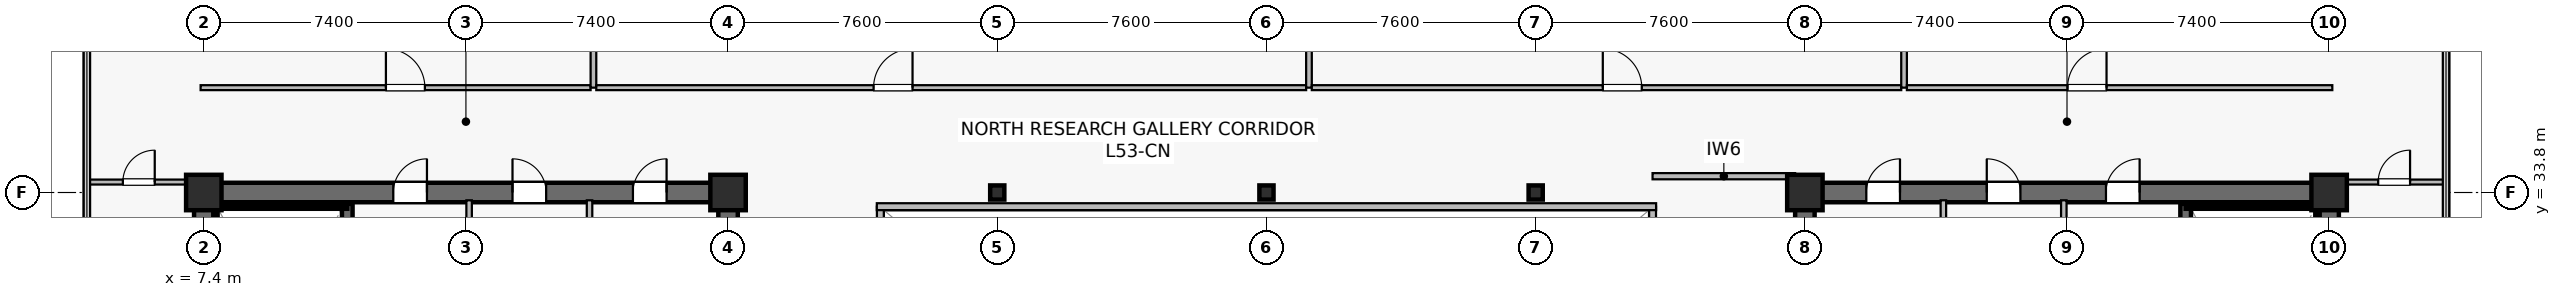
"""IFC4 building model, lengths in metres.
Left out: names, types, materials, properties, quantities, classifications, styles, units other than length and angle.
Written with IfcOpenShell. Run it as: python <this file> out.ifc"""

import sys

from ifc_helpers import new_model, si_unit, direction, frame, frame_2d, origin, origin_2d, place, context, subcontext, project, spatial, rectangle, hollow_rectangle, extrude, source, transform, mapped, element, fill, save


model = new_model("IFC4")
c1 = context("Model", 3, precision=1e-05, world=origin(), true_north=direction((0.0, 1.0)))
c2 = subcontext(c1, "Body", "Model", "MODEL_VIEW")
j1 = project(units=[si_unit("LENGTHUNIT", "METRE"), si_unit("PLANEANGLEUNIT", "RADIAN")], contexts=[c1])
p1 = place(None, origin())
s1 = spatial("IfcSite", under=j1, at=p1, CompositionType="ELEMENT")
p2 = place(p1, origin())
s2 = spatial("IfcBuilding", under=s1, at=p2, CompositionType="ELEMENT")
p3 = place(p2, frame((0.0, 0.0, 221.9)))
s3 = spatial("IfcBuildingStorey", under=s2, at=p3, CompositionType="ELEMENT", Elevation=221.9)
p4 = place(p3, frame((7.125, 33.8, 0.0), z_axis=(0.0, 0.0, 1.0), x_axis=(1.0, 0.0, 0.0)))
e1 = element("IfcWall", 1, at=p4, inside=s3, PredefinedType="SHEAR", context=c2, shape_type="SweptSolid", body=[
    extrude(rectangle(XDim=15.35, YDim=0.55, at=frame_2d((7.675, 0.0))), origin(), (0.0, 0.0, 1.0), 3.8),
])
p5 = place(p4, frame((5.625, 0.0, 0.0)))
e2 = element("IfcOpeningElement", 2, at=p5, cuts=e1, PredefinedType="OPENING", context=c2, shape_type="SweptSolid", body=[
    extrude(rectangle(XDim=0.95, YDim=2.15, at=frame_2d((0.475, 1.075))), frame((0.0, 0.285, 0.0), z_axis=(0.0, -1.0, 0.0), x_axis=(1.0, 0.0, 0.0)), (0.0, 0.0, 1.0), 0.57),
])
p6 = place(p4, frame((8.99, 0.0, 0.0)))
e3 = element("IfcOpeningElement", 3, at=p6, cuts=e1, PredefinedType="OPENING", context=c2, shape_type="SweptSolid", body=[
    extrude(rectangle(XDim=0.95, YDim=2.15, at=frame_2d((0.475, 1.075))), frame((0.0, 0.285, 0.0), z_axis=(0.0, -1.0, 0.0), x_axis=(1.0, 0.0, 0.0)), (0.0, 0.0, 1.0), 0.57),
])
p7 = place(p4, frame((12.39, 0.0, 0.0)))
e4 = element("IfcOpeningElement", 4, at=p7, cuts=e1, PredefinedType="OPENING", context=c2, shape_type="SweptSolid", body=[
    extrude(rectangle(XDim=0.95, YDim=2.15, at=frame_2d((0.475, 1.075))), frame((0.0, 0.285, 0.0), z_axis=(0.0, -1.0, 0.0), x_axis=(1.0, 0.0, 0.0)), (0.0, 0.0, 1.0), 0.57),
])
p8 = place(p3, frame((7.4, 15.075, 0.0), z_axis=(0.0, 0.0, 1.0), x_axis=(0.0, 1.0, 0.0)))
e5 = element("IfcWall", 5, at=p8, inside=s3, PredefinedType="SHEAR", context=c2, shape_type="SweptSolid", body=[
    extrude(rectangle(XDim=18.45, YDim=0.55, at=frame_2d((9.225, 0.0))), origin(), (0.0, 0.0, 1.0), 3.8),
])
p9 = place(p3, frame((22.2, 15.075, 0.0), z_axis=(0.0, 0.0, 1.0), x_axis=(0.0, 1.0, 0.0)))
e6 = element("IfcWall", 6, at=p9, inside=s3, PredefinedType="SHEAR", context=c2, shape_type="SweptSolid", body=[
    extrude(rectangle(XDim=18.45, YDim=0.55, at=frame_2d((9.225, 0.0))), origin(), (0.0, 0.0, 1.0), 3.8),
])
p10 = place(p9, frame((3.475, 0.0, 0.0)))
e7 = element("IfcOpeningElement", 7, at=p10, cuts=e6, PredefinedType="OPENING", context=c2, shape_type="SweptSolid", body=[
    extrude(rectangle(XDim=1.42, YDim=2.2, at=frame_2d((0.71, 1.1))), frame((0.0, 0.285, 0.0), z_axis=(0.0, -1.0, 0.0), x_axis=(1.0, 0.0, 0.0)), (0.0, 0.0, 1.0), 0.57),
])
p11 = place(p3, frame((11.45, 24.85, 0.0), z_axis=(0.0, 0.0, 1.0), x_axis=(0.0, 1.0, 0.0)))
e8 = element("IfcWall", 8, at=p11, inside=s3, PredefinedType="SHEAR", context=c2, shape_type="SweptSolid", body=[
    extrude(rectangle(XDim=8.63, YDim=0.3, at=frame_2d((4.315, 0.0))), origin(), (0.0, 0.0, 1.0), 3.8),
])
p12 = place(p11, frame((0.42, 0.0, 0.0)))
e9 = element("IfcOpeningElement", 9, at=p12, cuts=e8, PredefinedType="OPENING", context=c2, shape_type="SweptSolid", body=[
    extrude(rectangle(XDim=1.1, YDim=2.15, at=frame_2d((0.55, 1.075))), frame((0.0, 0.16, 0.0), z_axis=(0.0, -1.0, 0.0), x_axis=(1.0, 0.0, 0.0)), (0.0, 0.0, 1.0), 0.32),
])
p13 = place(p3, frame((7.73, 33.4, 0.0), z_axis=(0.0, 0.0, 1.0), x_axis=(1.0, 0.0, 0.0)))
e10 = element("IfcWall", 10, at=p13, inside=s3, PredefinedType="SOLIDWALL", context=c2, shape_type="SweptSolid", body=[
    extrude(rectangle(XDim=3.72, YDim=0.12, at=frame_2d((1.86, 0.0))), origin(), (0.0, 0.0, 1.0), 3.8),
])
p14 = place(p3, frame((7.73, 25.0, 0.0), z_axis=(0.0, 0.0, 1.0), x_axis=(0.0, 1.0, 0.0)))
e11 = element("IfcWall", 11, at=p14, inside=s3, PredefinedType="SOLIDWALL", context=c2, shape_type="SweptSolid", body=[
    extrude(rectangle(XDim=8.32, YDim=0.12, at=frame_2d((4.16, 0.0))), origin(), (0.0, 0.0, 1.0), 3.8),
])
p15 = place(p3, frame((52.325, 33.8, 0.0), z_axis=(0.0, 0.0, 1.0), x_axis=(1.0, 0.0, 0.0)))
e12 = element("IfcWall", 12, at=p15, inside=s3, PredefinedType="SHEAR", context=c2, shape_type="SweptSolid", body=[
    extrude(rectangle(XDim=15.35, YDim=0.55, at=frame_2d((7.675, 0.0))), origin(), (0.0, 0.0, 1.0), 3.8),
])
p16 = place(p15, frame((8.775, 0.0, 0.0)))
e13 = element("IfcOpeningElement", 13, at=p16, cuts=e12, PredefinedType="OPENING", context=c2, shape_type="SweptSolid", body=[
    extrude(rectangle(XDim=0.95, YDim=2.15, at=frame_2d((0.475, 1.075))), frame((0.0, 0.285, 0.0), z_axis=(0.0, -1.0, 0.0), x_axis=(1.0, 0.0, 0.0)), (0.0, 0.0, 1.0), 0.57),
])
p17 = place(p15, frame((5.41, 0.0, 0.0)))
e14 = element("IfcOpeningElement", 14, at=p17, cuts=e12, PredefinedType="OPENING", context=c2, shape_type="SweptSolid", body=[
    extrude(rectangle(XDim=0.95, YDim=2.15, at=frame_2d((0.475, 1.075))), frame((0.0, 0.285, 0.0), z_axis=(0.0, -1.0, 0.0), x_axis=(1.0, 0.0, 0.0)), (0.0, 0.0, 1.0), 0.57),
])
p18 = place(p15, frame((2.01, 0.0, 0.0)))
e15 = element("IfcOpeningElement", 15, at=p18, cuts=e12, PredefinedType="OPENING", context=c2, shape_type="SweptSolid", body=[
    extrude(rectangle(XDim=0.95, YDim=2.15, at=frame_2d((0.475, 1.075))), frame((0.0, 0.285, 0.0), z_axis=(0.0, -1.0, 0.0), x_axis=(1.0, 0.0, 0.0)), (0.0, 0.0, 1.0), 0.57),
])
p19 = place(p3, frame((52.6, 15.075, 0.0), z_axis=(0.0, 0.0, 1.0), x_axis=(0.0, 1.0, 0.0)))
e16 = element("IfcWall", 16, at=p19, inside=s3, PredefinedType="SHEAR", context=c2, shape_type="SweptSolid", body=[
    extrude(rectangle(XDim=18.45, YDim=0.55, at=frame_2d((9.225, 0.0))), origin(), (0.0, 0.0, 1.0), 3.8),
])
p20 = place(p19, frame((3.475, 0.0, 0.0)))
e17 = element("IfcOpeningElement", 17, at=p20, cuts=e16, PredefinedType="OPENING", context=c2, shape_type="SweptSolid", body=[
    extrude(rectangle(XDim=1.42, YDim=2.2, at=frame_2d((0.71, 1.1))), frame((0.0, 0.285, 0.0), z_axis=(0.0, -1.0, 0.0), x_axis=(1.0, 0.0, 0.0)), (0.0, 0.0, 1.0), 0.57),
])
p21 = place(p3, frame((67.4, 15.075, 0.0), z_axis=(0.0, 0.0, 1.0), x_axis=(0.0, 1.0, 0.0)))
e18 = element("IfcWall", 18, at=p21, inside=s3, PredefinedType="SHEAR", context=c2, shape_type="SweptSolid", body=[
    extrude(rectangle(XDim=18.45, YDim=0.55, at=frame_2d((9.225, 0.0))), origin(), (0.0, 0.0, 1.0), 3.8),
])
p22 = place(p3, frame((63.35, 24.85, 0.0), z_axis=(0.0, 0.0, 1.0), x_axis=(0.0, 1.0, 0.0)))
e19 = element("IfcWall", 19, at=p22, inside=s3, PredefinedType="SHEAR", context=c2, shape_type="SweptSolid", body=[
    extrude(rectangle(XDim=8.63, YDim=0.3, at=frame_2d((4.315, 0.0))), origin(), (0.0, 0.0, 1.0), 3.8),
])
p23 = place(p22, frame((0.42, 0.0, 0.0)))
e20 = element("IfcOpeningElement", 20, at=p23, cuts=e19, PredefinedType="OPENING", context=c2, shape_type="SweptSolid", body=[
    extrude(rectangle(XDim=1.1, YDim=2.15, at=frame_2d((0.55, 1.075))), frame((0.0, 0.16, 0.0), z_axis=(0.0, -1.0, 0.0), x_axis=(1.0, 0.0, 0.0)), (0.0, 0.0, 1.0), 0.32),
])
p24 = place(p3, frame((63.35, 33.4, 0.0), z_axis=(0.0, 0.0, 1.0), x_axis=(1.0, 0.0, 0.0)))
e21 = element("IfcWall", 21, at=p24, inside=s3, PredefinedType="SOLIDWALL", context=c2, shape_type="SweptSolid", body=[
    extrude(rectangle(XDim=3.72, YDim=0.12, at=frame_2d((1.86, 0.0))), origin(), (0.0, 0.0, 1.0), 3.8),
])
p25 = place(p3, frame((67.07, 25.0, 0.0), z_axis=(0.0, 0.0, 1.0), x_axis=(0.0, 1.0, 0.0)))
e22 = element("IfcWall", 22, at=p25, inside=s3, PredefinedType="SOLIDWALL", context=c2, shape_type="SweptSolid", body=[
    extrude(rectangle(XDim=8.32, YDim=0.12, at=frame_2d((4.16, 0.0))), origin(), (0.0, 0.0, 1.0), 3.8),
])
m1 = source(origin(), c2, "Body", "SweptSolid", [
    extrude(rectangle(XDim=1.0, YDim=1.0, at=origin_2d()), origin(), (0.0, 0.0, 1.0), 4.1),
])
for number, where, z_axis, x_axis in (
    (23, (7.4, 33.8, 0.0), (0.0, 0.0, 1.0), (1.0, 0.0, 0.0)),
    (24, (22.2, 33.8, 0.0), (0.0, 0.0, 1.0), (1.0, 0.0, 0.0)),
    (25, (52.6, 33.8, 0.0), (0.0, 0.0, 1.0), (1.0, 0.0, 0.0)),
    (26, (67.4, 33.8, 0.0), (0.0, 0.0, 1.0), (1.0, 0.0, 0.0)),
):
    element("IfcColumn", number, at=place(p3, frame(where, z_axis=z_axis, x_axis=x_axis)), inside=s3, PredefinedType="COLUMN", context=c2, shape_type="MappedRepresentation", body=[
        mapped(m1, transform((0.0, 0.0, 0.0), scale=1.0)),
    ])
m2 = source(origin(), c2, "Body", "SweptSolid", [
    extrude(hollow_rectangle(XDim=0.4, YDim=0.4, WallThickness=0.019, at=origin_2d()), origin(), (0.0, 0.0, 1.0), 4.1),
])
for number, where, z_axis, x_axis in (
    (27, (29.8, 33.8, 0.0), (0.0, 0.0, 1.0), (1.0, 0.0, 0.0)),
    (28, (37.4, 33.8, 0.0), (0.0, 0.0, 1.0), (1.0, 0.0, 0.0)),
    (29, (45.0, 33.8, 0.0), (0.0, 0.0, 1.0), (1.0, 0.0, 0.0)),
):
    element("IfcColumn", number, at=place(p3, frame(where, z_axis=z_axis, x_axis=x_axis)), inside=s3, PredefinedType="COLUMN", context=c2, shape_type="MappedRepresentation", body=[
        mapped(m2, transform((0.0, 0.0, 0.0), scale=1.0)),
    ])
p26 = place(p3, frame((14.89, 29.65, 0.0), z_axis=(0.0, 0.0, 1.0), x_axis=(0.0, 1.0, 0.0)))
e30 = element("IfcWall", 30, at=p26, inside=s3, PredefinedType="PLUMBINGWALL", context=c2, shape_type="SweptSolid", body=[
    extrude(rectangle(XDim=3.93, YDim=0.155, at=frame_2d((1.965, 0.0))), origin(), (0.0, 0.0, 1.0), 3.197),
])
p27 = place(p3, frame((18.29, 29.65, 0.0), z_axis=(0.0, 0.0, 1.0), x_axis=(0.0, 1.0, 0.0)))
e31 = element("IfcWall", 31, at=p27, inside=s3, PredefinedType="PLUMBINGWALL", context=c2, shape_type="SweptSolid", body=[
    extrude(rectangle(XDim=3.93, YDim=0.155, at=frame_2d((1.965, 0.0))), origin(), (0.0, 0.0, 1.0), 3.8),
])
p28 = place(p3, frame((59.91, 29.65, 0.0), z_axis=(0.0, 0.0, 1.0), x_axis=(0.0, 1.0, 0.0)))
e32 = element("IfcWall", 32, at=p28, inside=s3, PredefinedType="PLUMBINGWALL", context=c2, shape_type="SweptSolid", body=[
    extrude(rectangle(XDim=3.93, YDim=0.155, at=frame_2d((1.965, 0.0))), origin(), (0.0, 0.0, 1.0), 3.197),
])
p29 = place(p3, frame((56.51, 29.65, 0.0), z_axis=(0.0, 0.0, 1.0), x_axis=(0.0, 1.0, 0.0)))
e33 = element("IfcWall", 33, at=p29, inside=s3, PredefinedType="PLUMBINGWALL", context=c2, shape_type="SweptSolid", body=[
    extrude(rectangle(XDim=3.93, YDim=0.155, at=frame_2d((1.965, 0.0))), origin(), (0.0, 0.0, 1.0), 3.8),
])
p30 = place(p3, frame((48.3, 34.26, 0.0), z_axis=(0.0, 0.0, 1.0), x_axis=(1.0, 0.0, 0.0)))
e34 = element("IfcWall", 34, at=p30, inside=s3, PredefinedType="PARTITIONING", context=c2, shape_type="SweptSolid", body=[
    extrude(rectangle(XDim=4.025, YDim=0.175, at=frame_2d((2.012, 0.0))), origin(), (0.0, 0.0, 1.0), 3.485),
])
p31 = place(p3, frame((26.5, 15.2, 0.0), z_axis=(0.0, 0.0, 1.0), x_axis=(0.0, 1.0, 0.0)))
e35 = element("IfcWall", 35, at=p31, inside=s3, PredefinedType="SOLIDWALL", context=c2, shape_type="SweptSolid", body=[
    extrude(rectangle(XDim=18.2, YDim=0.195, at=frame_2d((9.1, 0.0))), origin(), (0.0, 0.0, 1.0), 3.8),
])
p32 = place(p31, frame((1.8, 0.0, 0.9)))
e36 = element("IfcOpeningElement", 36, at=p32, cuts=e35, PredefinedType="OPENING", context=c2, shape_type="SweptSolid", body=[
    extrude(rectangle(XDim=1.2, YDim=1.35, at=frame_2d((0.6, 0.675))), frame((0.0, 0.107, 0.0), z_axis=(0.0, -1.0, 0.0), x_axis=(1.0, 0.0, 0.0)), (0.0, 0.0, 1.0), 0.215),
])
p33 = place(p31, frame((13.2, 0.0, 0.9)))
e37 = element("IfcOpeningElement", 37, at=p33, cuts=e35, PredefinedType="OPENING", context=c2, shape_type="SweptSolid", body=[
    extrude(rectangle(XDim=1.2, YDim=1.35, at=frame_2d((0.6, 0.675))), frame((0.0, 0.107, 0.0), z_axis=(0.0, -1.0, 0.0), x_axis=(1.0, 0.0, 0.0)), (0.0, 0.0, 1.0), 0.215),
])
p34 = place(p3, frame((48.3, 15.2, 0.0), z_axis=(0.0, 0.0, 1.0), x_axis=(0.0, 1.0, 0.0)))
e38 = element("IfcWall", 38, at=p34, inside=s3, PredefinedType="SOLIDWALL", context=c2, shape_type="SweptSolid", body=[
    extrude(rectangle(XDim=18.2, YDim=0.195, at=frame_2d((9.1, 0.0))), origin(), (0.0, 0.0, 1.0), 3.8),
])
p35 = place(p34, frame((1.8, 0.0, 0.9)))
e39 = element("IfcOpeningElement", 39, at=p35, cuts=e38, PredefinedType="OPENING", context=c2, shape_type="SweptSolid", body=[
    extrude(rectangle(XDim=1.2, YDim=1.35, at=frame_2d((0.6, 0.675))), frame((0.0, 0.107, 0.0), z_axis=(0.0, -1.0, 0.0), x_axis=(1.0, 0.0, 0.0)), (0.0, 0.0, 1.0), 0.215),
])
p36 = place(p34, frame((13.2, 0.0, 0.9)))
e40 = element("IfcOpeningElement", 40, at=p36, cuts=e38, PredefinedType="OPENING", context=c2, shape_type="SweptSolid", body=[
    extrude(rectangle(XDim=1.2, YDim=1.35, at=frame_2d((0.6, 0.675))), frame((0.0, 0.107, 0.0), z_axis=(0.0, -1.0, 0.0), x_axis=(1.0, 0.0, 0.0)), (0.0, 0.0, 1.0), 0.215),
])
p37 = place(p3, frame((26.4, 33.4, 0.0), z_axis=(0.0, 0.0, 1.0), x_axis=(1.0, 0.0, 0.0)))
e41 = element("IfcWall", 41, at=p37, inside=s3, PredefinedType="SOLIDWALL", context=c2, shape_type="SweptSolid", body=[
    extrude(rectangle(XDim=22.0, YDim=0.195, at=frame_2d((11.0, 0.0))), origin(), (0.0, 0.0, 1.0), 3.8),
])
p38 = place(p3, frame((7.31, 36.76, 0.0), z_axis=(0.0, 0.0, 1.0), x_axis=(1.0, 0.0, 0.0)))
e42 = element("IfcWall", 42, at=p38, inside=s3, PredefinedType="PARTITIONING", context=c2, shape_type="SweptSolid", body=[
    extrude(rectangle(XDim=11.01, YDim=0.14, at=frame_2d((5.505, 0.0))), origin(), (0.0, 0.0, 1.0), 3.197),
])
p39 = place(p38, frame((5.231, 0.0, 0.0)))
e43 = element("IfcOpeningElement", 43, at=p39, cuts=e42, PredefinedType="OPENING", context=c2, shape_type="SweptSolid", body=[
    extrude(rectangle(XDim=1.1, YDim=2.18, at=frame_2d((0.55, 1.09))), frame((0.0, 0.08, 0.0), z_axis=(0.0, -1.0, 0.0), x_axis=(1.0, 0.0, 0.0)), (0.0, 0.0, 1.0), 0.16),
])
p40 = place(p3, frame((18.4, 36.76, 0.0), z_axis=(0.0, 0.0, 1.0), x_axis=(0.0, 1.0, 0.0)))
e44 = element("IfcWall", 44, at=p40, inside=s3, PredefinedType="PARTITIONING", context=c2, shape_type="SweptSolid", body=[
    extrude(rectangle(XDim=9.13, YDim=0.16, at=frame_2d((4.565, 0.0))), origin(), (0.0, 0.0, 1.0), 3.135),
])
p41 = place(p3, frame((18.48, 36.76, 0.0), z_axis=(0.0, 0.0, 1.0), x_axis=(1.0, 0.0, 0.0)))
e45 = element("IfcWall", 45, at=p41, inside=s3, PredefinedType="PARTITIONING", context=c2, shape_type="SweptSolid", body=[
    extrude(rectangle(XDim=20.04, YDim=0.14, at=frame_2d((10.02, 0.0))), origin(), (0.0, 0.0, 1.0), 3.197),
])
p42 = place(p41, frame((7.828, 0.0, 0.0)))
e46 = element("IfcOpeningElement", 46, at=p42, cuts=e45, PredefinedType="OPENING", context=c2, shape_type="SweptSolid", body=[
    extrude(rectangle(XDim=1.1, YDim=2.18, at=frame_2d((0.55, 1.09))), frame((0.0, 0.08, 0.0), z_axis=(0.0, -1.0, 0.0), x_axis=(1.0, 0.0, 0.0)), (0.0, 0.0, 1.0), 0.16),
])
p43 = place(p3, frame((38.6, 36.76, 0.0), z_axis=(0.0, 0.0, 1.0), x_axis=(0.0, 1.0, 0.0)))
e47 = element("IfcWall", 47, at=p43, inside=s3, PredefinedType="PARTITIONING", context=c2, shape_type="SweptSolid", body=[
    extrude(rectangle(XDim=7.93, YDim=0.16, at=frame_2d((3.965, 0.0))), origin(), (0.0, 0.0, 1.0), 3.135),
])
p44 = place(p3, frame((38.68, 36.76, 0.0), z_axis=(0.0, 0.0, 1.0), x_axis=(1.0, 0.0, 0.0)))
e48 = element("IfcWall", 48, at=p44, inside=s3, PredefinedType="PARTITIONING", context=c2, shape_type="SweptSolid", body=[
    extrude(rectangle(XDim=16.64, YDim=0.14, at=frame_2d((8.32, 0.0))), origin(), (0.0, 0.0, 1.0), 3.197),
])
p45 = place(p44, frame((8.215, 0.0, 0.0)))
e49 = element("IfcOpeningElement", 49, at=p45, cuts=e48, PredefinedType="OPENING", context=c2, shape_type="SweptSolid", body=[
    extrude(rectangle(XDim=1.1, YDim=2.18, at=frame_2d((0.55, 1.09))), frame((0.0, 0.08, 0.0), z_axis=(0.0, -1.0, 0.0), x_axis=(1.0, 0.0, 0.0)), (0.0, 0.0, 1.0), 0.16),
])
p46 = place(p3, frame((55.4, 36.76, 0.0), z_axis=(0.0, 0.0, 1.0), x_axis=(0.0, 1.0, 0.0)))
e50 = element("IfcWall", 50, at=p46, inside=s3, PredefinedType="PARTITIONING", context=c2, shape_type="SweptSolid", body=[
    extrude(rectangle(XDim=9.13, YDim=0.16, at=frame_2d((4.565, 0.0))), origin(), (0.0, 0.0, 1.0), 3.135),
])
p47 = place(p3, frame((55.48, 36.76, 0.0), z_axis=(0.0, 0.0, 1.0), x_axis=(1.0, 0.0, 0.0)))
e51 = element("IfcWall", 51, at=p47, inside=s3, PredefinedType="PARTITIONING", context=c2, shape_type="SweptSolid", body=[
    extrude(rectangle(XDim=12.01, YDim=0.14, at=frame_2d((6.005, 0.0))), origin(), (0.0, 0.0, 1.0), 3.197),
])
p48 = place(p47, frame((4.536, 0.0, 0.0)))
e52 = element("IfcOpeningElement", 52, at=p48, cuts=e51, PredefinedType="OPENING", context=c2, shape_type="SweptSolid", body=[
    extrude(rectangle(XDim=1.1, YDim=2.18, at=frame_2d((0.55, 1.09))), frame((0.0, 0.08, 0.0), z_axis=(0.0, -1.0, 0.0), x_axis=(1.0, 0.0, 0.0)), (0.0, 0.0, 1.0), 0.16),
])
p49 = place(p3, frame((4.11, 34.095, 0.0), z_axis=(0.0, 0.0, 1.0), x_axis=(1.0, 0.0, 0.0)))
e53 = element("IfcWall", 53, at=p49, inside=s3, PredefinedType="PARTITIONING", context=c2, shape_type="SweptSolid", body=[
    extrude(rectangle(XDim=2.91, YDim=0.14, at=frame_2d((1.455, 0.0))), origin(), (0.0, 0.0, 1.0), 3.8),
])
p50 = place(p49, frame((1.005, 0.0, 0.0)))
e54 = element("IfcOpeningElement", 54, at=p50, cuts=e53, PredefinedType="OPENING", context=c2, shape_type="SweptSolid", body=[
    extrude(rectangle(XDim=0.9, YDim=2.1, at=frame_2d((0.45, 1.05))), frame((0.0, 0.08, 0.0), z_axis=(0.0, -1.0, 0.0), x_axis=(1.0, 0.0, 0.0)), (0.0, 0.0, 1.0), 0.16),
])
p51 = place(p3, frame((67.78, 34.095, 0.0), z_axis=(0.0, 0.0, 1.0), x_axis=(1.0, 0.0, 0.0)))
e55 = element("IfcWall", 55, at=p51, inside=s3, PredefinedType="PARTITIONING", context=c2, shape_type="SweptSolid", body=[
    extrude(rectangle(XDim=2.91, YDim=0.14, at=frame_2d((1.455, 0.0))), origin(), (0.0, 0.0, 1.0), 3.8),
])
p52 = place(p51, frame((1.005, 0.0, 0.0)))
e56 = element("IfcOpeningElement", 56, at=p52, cuts=e55, PredefinedType="OPENING", context=c2, shape_type="SweptSolid", body=[
    extrude(rectangle(XDim=0.9, YDim=2.1, at=frame_2d((0.45, 1.05))), frame((0.0, 0.08, 0.0), z_axis=(0.0, -1.0, 0.0), x_axis=(1.0, 0.0, 0.0)), (0.0, 0.0, 1.0), 0.16),
])
m3 = source(origin(), c2, "Body", "SweptSolid", [
    extrude(rectangle(XDim=0.95, YDim=2.15, at=frame_2d((0.475, 1.075))), frame((0.0, 0.025, 0.0), z_axis=(0.0, -1.0, 0.0), x_axis=(1.0, 0.0, 0.0)), (0.0, 0.0, 1.0), 0.05),
])
p53 = place(p5, origin())
e57 = element("IfcDoor", 57, at=p53, inside=s3, OperationType="SINGLE_SWING_RIGHT", PredefinedType="DOOR", context=c2, shape_type="MappedRepresentation", body=[
    mapped(m3, transform((0.0, 0.0, 0.0), scale=1.0)),
])
fill(e2, e57)
p54 = place(p6, origin())
e58 = element("IfcDoor", 58, at=p54, inside=s3, OperationType="SINGLE_SWING_LEFT", PredefinedType="DOOR", context=c2, shape_type="MappedRepresentation", body=[
    mapped(m3, transform((0.0, 0.0, 0.0), scale=1.0)),
])
fill(e3, e58)
p55 = place(p7, origin())
e59 = element("IfcDoor", 59, at=p55, inside=s3, OperationType="SINGLE_SWING_RIGHT", PredefinedType="DOOR", context=c2, shape_type="MappedRepresentation", body=[
    mapped(m3, transform((0.0, 0.0, 0.0), scale=1.0)),
])
fill(e4, e59)
p56 = place(p16, origin())
e60 = element("IfcDoor", 60, at=p56, inside=s3, OperationType="SINGLE_SWING_RIGHT", PredefinedType="DOOR", context=c2, shape_type="MappedRepresentation", body=[
    mapped(m3, transform((0.0, 0.0, 0.0), scale=1.0)),
])
fill(e13, e60)
p57 = place(p17, origin())
e61 = element("IfcDoor", 61, at=p57, inside=s3, OperationType="SINGLE_SWING_LEFT", PredefinedType="DOOR", context=c2, shape_type="MappedRepresentation", body=[
    mapped(m3, transform((0.0, 0.0, 0.0), scale=1.0)),
])
fill(e14, e61)
p58 = place(p18, origin())
e62 = element("IfcDoor", 62, at=p58, inside=s3, OperationType="SINGLE_SWING_RIGHT", PredefinedType="DOOR", context=c2, shape_type="MappedRepresentation", body=[
    mapped(m3, transform((0.0, 0.0, 0.0), scale=1.0)),
])
fill(e15, e62)
m4 = source(origin(), c2, "Body", "SweptSolid", [
    extrude(rectangle(XDim=1.1, YDim=2.18, at=frame_2d((0.55, 1.09))), frame((0.0, 0.025, 0.0), z_axis=(0.0, -1.0, 0.0), x_axis=(1.0, 0.0, 0.0)), (0.0, 0.0, 1.0), 0.05),
])
p59 = place(p39, origin())
e63 = element("IfcDoor", 63, at=p59, inside=s3, OperationType="SINGLE_SWING_LEFT", PredefinedType="DOOR", context=c2, shape_type="MappedRepresentation", body=[
    mapped(m4, transform((0.0, 0.0, 0.0), scale=1.0)),
])
fill(e43, e63)
p60 = place(p42, origin())
e64 = element("IfcDoor", 64, at=p60, inside=s3, OperationType="SINGLE_SWING_RIGHT", PredefinedType="DOOR", context=c2, shape_type="MappedRepresentation", body=[
    mapped(m4, transform((0.0, 0.0, 0.0), scale=1.0)),
])
fill(e46, e64)
p61 = place(p45, origin())
e65 = element("IfcDoor", 65, at=p61, inside=s3, OperationType="SINGLE_SWING_LEFT", PredefinedType="DOOR", context=c2, shape_type="MappedRepresentation", body=[
    mapped(m4, transform((0.0, 0.0, 0.0), scale=1.0)),
])
fill(e49, e65)
p62 = place(p48, origin())
e66 = element("IfcDoor", 66, at=p62, inside=s3, OperationType="SINGLE_SWING_RIGHT", PredefinedType="DOOR", context=c2, shape_type="MappedRepresentation", body=[
    mapped(m4, transform((0.0, 0.0, 0.0), scale=1.0)),
])
fill(e52, e66)
m5 = source(origin(), c2, "Body", "SweptSolid", [
    extrude(rectangle(XDim=0.9, YDim=2.1, at=frame_2d((0.45, 1.05))), frame((0.0, 0.025, 0.0), z_axis=(0.0, -1.0, 0.0), x_axis=(1.0, 0.0, 0.0)), (0.0, 0.0, 1.0), 0.05),
])
p63 = place(p50, origin())
e67 = element("IfcDoor", 67, at=p63, inside=s3, OperationType="SINGLE_SWING_RIGHT", PredefinedType="DOOR", context=c2, shape_type="MappedRepresentation", body=[
    mapped(m5, transform((0.0, 0.0, 0.0), scale=1.0)),
])
fill(e54, e67)
p64 = place(p52, origin())
e68 = element("IfcDoor", 68, at=p64, inside=s3, OperationType="SINGLE_SWING_RIGHT", PredefinedType="DOOR", context=c2, shape_type="MappedRepresentation", body=[
    mapped(m5, transform((0.0, 0.0, 0.0), scale=1.0)),
])
fill(e56, e68)
save(model, sys.argv[1])
